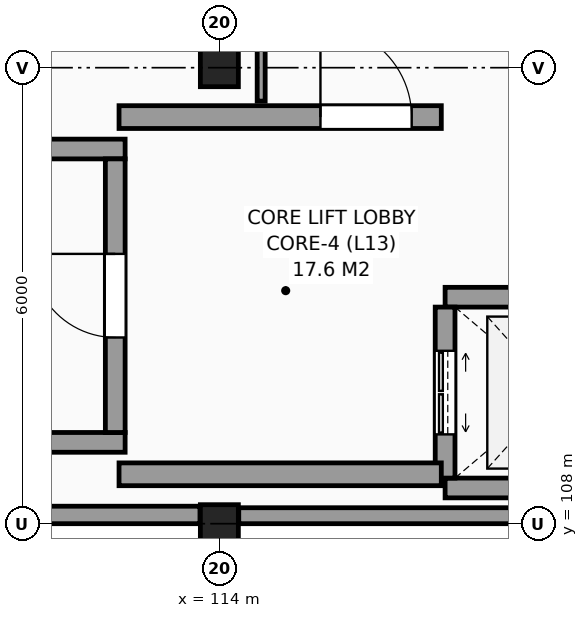
"""IFC4 building model, lengths in metres.
Left out: names, types, materials, properties, quantities, classifications, styles, units other than length and angle.
Written with IfcOpenShell. Run it as: python <this file> out.ifc"""

import sys

from ifc_helpers import new_model, si_unit, direction, frame, frame_2d, origin, origin_2d, place, context, subcontext, project, spatial, rectangle, extrude, element, fill, save


model = new_model("IFC4")
c1 = context("Model", 3, precision=1e-05, world=origin(), true_north=direction((0.0, 1.0)))
c2 = subcontext(c1, "Body", "Model", "MODEL_VIEW")
j1 = project(units=[si_unit("LENGTHUNIT", "METRE"), si_unit("PLANEANGLEUNIT", "RADIAN")], contexts=[c1])
p1 = place(None, origin())
s1 = spatial("IfcSite", under=j1, at=p1, CompositionType="ELEMENT")
p2 = place(p1, origin())
s2 = spatial("IfcBuilding", under=s1, at=p2, CompositionType="ELEMENT")
p3 = place(p2, frame((0.0, 0.0, 51.3)))
s3 = spatial("IfcBuildingStorey", under=s2, at=p3, CompositionType="ELEMENT", Elevation=51.3)
for number, where, z_axis, x_axis in (
    (1, (114.0, 108.0, 0.0), (0.0, 0.0, 1.0), (1.0, 0.0, 0.0)),
    (2, (114.0, 114.0, 0.0), (0.0, 0.0, 1.0), (1.0, 0.0, 0.0)),
):
    element("IfcColumn", number, at=place(p3, frame(where, z_axis=z_axis, x_axis=x_axis)), inside=s3, PredefinedType="COLUMN", context=c2, shape_type="SweptSolid", body=[
        extrude(rectangle(XDim=0.5, YDim=0.5, at=origin_2d()), origin(), (0.0, 0.0, 1.0), 3.3),
    ])
p4 = place(p3, frame((108.255, 108.115, 0.0), z_axis=(0.0, 0.0, 1.0), x_axis=(1.0, 0.0, 0.0)))
e3 = element("IfcWall", 3, at=p4, inside=s3, PredefinedType="SOLIDWALL", context=c2, shape_type="SweptSolid", body=[
    extrude(rectangle(XDim=5.49, YDim=0.23, at=frame_2d((2.745, 0.0))), origin(), (0.0, 0.0, 1.0), 2.51),
])
p5 = place(p3, frame((114.255, 108.105, 0.0), z_axis=(0.0, 0.0, 1.0), x_axis=(1.0, 0.0, 0.0)))
e4 = element("IfcWall", 4, at=p5, inside=s3, PredefinedType="SOLIDWALL", context=c2, shape_type="SweptSolid", body=[
    extrude(rectangle(XDim=5.49, YDim=0.21, at=frame_2d((2.745, 0.0))), origin(), (0.0, 0.0, 1.0), 2.62),
])
for number, where, z_axis, x_axis in (
    (5, (102.04, 109.07, 0.0), (0.0, 0.0, 1.0), (1.0, 0.0, 0.0)),
    (6, (102.04, 112.93, 0.0), (0.0, 0.0, 1.0), (1.0, 0.0, 0.0)),
):
    element("IfcWall", number, at=place(p3, frame(where, z_axis=z_axis, x_axis=x_axis)), inside=s3, PredefinedType="SHEAR", context=c2, shape_type="SweptSolid", body=[
        extrude(rectangle(XDim=10.72, YDim=0.26, at=frame_2d((5.36, 0.0))), origin(), (0.0, 0.0, 1.0), 3.3),
    ])
p6 = place(p3, frame((112.63, 109.2, 0.0), z_axis=(0.0, 0.0, 1.0), x_axis=(0.0, 1.0, 0.0)))
e7 = element("IfcWall", 7, at=p6, inside=s3, PredefinedType="SHEAR", context=c2, shape_type="SweptSolid", body=[
    extrude(rectangle(XDim=3.6, YDim=0.26, at=frame_2d((1.8, 0.0))), origin(), (0.0, 0.0, 1.0), 3.3),
])
p7 = place(p6, frame((1.25, 0.0, 0.0)))
e8 = element("IfcOpeningElement", 8, at=p7, cuts=e7, PredefinedType="OPENING", context=c2, shape_type="SweptSolid", body=[
    extrude(rectangle(XDim=1.1, YDim=2.15, at=frame_2d((0.55, 1.075))), frame((0.0, 0.14, 0.0), z_axis=(0.0, -1.0, 0.0), x_axis=(1.0, 0.0, 0.0)), (0.0, 0.0, 1.0), 0.28),
])
for number, where, z_axis, x_axis in (
    (9, (116.97, 108.47, 0.0), (0.0, 0.0, 1.0), (1.0, 0.0, 0.0)),
    (10, (116.97, 110.98, 0.0), (0.0, 0.0, 1.0), (1.0, 0.0, 0.0)),
):
    element("IfcWall", number, at=place(p3, frame(where, z_axis=z_axis, x_axis=x_axis)), inside=s3, PredefinedType="SHEAR", context=c2, shape_type="SweptSolid", body=[
        extrude(rectangle(XDim=2.91, YDim=0.26, at=frame_2d((1.455, 0.0))), origin(), (0.0, 0.0, 1.0), 3.3),
    ])
p8 = place(p3, frame((116.97, 108.6, 0.0), z_axis=(0.0, 0.0, 1.0), x_axis=(0.0, 1.0, 0.0)))
e11 = element("IfcWall", 11, at=p8, inside=s3, PredefinedType="SHEAR", context=c2, shape_type="SweptSolid", body=[
    extrude(rectangle(XDim=2.25, YDim=0.26, at=frame_2d((1.125, 0.0))), origin(), (0.0, 0.0, 1.0), 3.3),
])
p9 = place(p8, frame((0.575, 0.0, 0.0)))
e12 = element("IfcOpeningElement", 12, at=p9, cuts=e11, PredefinedType="OPENING", context=c2, shape_type="SweptSolid", body=[
    extrude(rectangle(XDim=1.1, YDim=2.2, at=frame_2d((0.55, 1.1))), frame((0.0, 0.14, 0.0), z_axis=(0.0, -1.0, 0.0), x_axis=(1.0, 0.0, 0.0)), (0.0, 0.0, 1.0), 0.28),
])
p10 = place(p3, frame((112.68, 113.35, 0.0), z_axis=(0.0, 0.0, 1.0), x_axis=(1.0, 0.0, 0.0)))
e13 = element("IfcWall", 13, at=p10, inside=s3, PredefinedType="SHEAR", context=c2, shape_type="SweptSolid", body=[
    extrude(rectangle(XDim=4.24, YDim=0.3, at=frame_2d((2.12, 0.0))), origin(), (0.0, 0.0, 1.0), 3.3),
])
p11 = place(p10, frame((2.65, 0.0, 0.0)))
e14 = element("IfcOpeningElement", 14, at=p11, cuts=e13, PredefinedType="OPENING", context=c2, shape_type="SweptSolid", body=[
    extrude(rectangle(XDim=1.2, YDim=2.2, at=frame_2d((0.6, 1.1))), frame((0.0, 0.16, 0.0), z_axis=(0.0, -1.0, 0.0), x_axis=(1.0, 0.0, 0.0)), (0.0, 0.0, 1.0), 0.32),
])
p12 = place(p3, frame((112.68, 108.65, 0.0), z_axis=(0.0, 0.0, 1.0), x_axis=(1.0, 0.0, 0.0)))
e15 = element("IfcWall", 15, at=p12, inside=s3, PredefinedType="SHEAR", context=c2, shape_type="SweptSolid", body=[
    extrude(rectangle(XDim=4.24, YDim=0.3, at=frame_2d((2.12, 0.0))), origin(), (0.0, 0.0, 1.0), 3.3),
])
p13 = place(p3, frame((114.55, 113.56, 0.0), z_axis=(0.0, 0.0, 1.0), x_axis=(0.0, 1.0, 0.0)))
e16 = element("IfcWall", 16, at=p13, inside=s3, PredefinedType="PARTITIONING", context=c2, shape_type="SweptSolid", body=[
    extrude(rectangle(XDim=3.84, YDim=0.105, at=frame_2d((1.92, 0.0))), origin(), (0.0, 0.0, 1.0), 3.06),
])
p14 = place(p7, origin())
e17 = element("IfcDoor", 17, at=p14, inside=s3, OperationType="SINGLE_SWING_RIGHT", PredefinedType="DOOR", context=c2, shape_type="SweptSolid", body=[
    extrude(rectangle(XDim=1.1, YDim=2.15, at=frame_2d((0.55, 1.075))), frame((0.0, 0.025, 0.0), z_axis=(0.0, -1.0, 0.0), x_axis=(1.0, 0.0, 0.0)), (0.0, 0.0, 1.0), 0.05),
])
fill(e8, e17)
p15 = place(p9, origin())
e18 = element("IfcDoor", 18, at=p15, inside=s3, OperationType="DOUBLE_DOOR_SLIDING", PredefinedType="DOOR", context=c2, shape_type="SweptSolid", body=[
    extrude(rectangle(XDim=1.1, YDim=2.2, at=frame_2d((0.55, 1.1))), frame((0.0, 0.025, 0.0), z_axis=(0.0, -1.0, 0.0), x_axis=(1.0, 0.0, 0.0)), (0.0, 0.0, 1.0), 0.05),
])
fill(e12, e18)
p16 = place(p11, origin())
e19 = element("IfcDoor", 19, at=p16, inside=s3, OperationType="SINGLE_SWING_LEFT", PredefinedType="DOOR", context=c2, shape_type="SweptSolid", body=[
    extrude(rectangle(XDim=1.2, YDim=2.2, at=frame_2d((0.6, 1.1))), frame((0.0, 0.025, 0.0), z_axis=(0.0, -1.0, 0.0), x_axis=(1.0, 0.0, 0.0)), (0.0, 0.0, 1.0), 0.05),
])
fill(e14, e19)
save(model, sys.argv[1])
